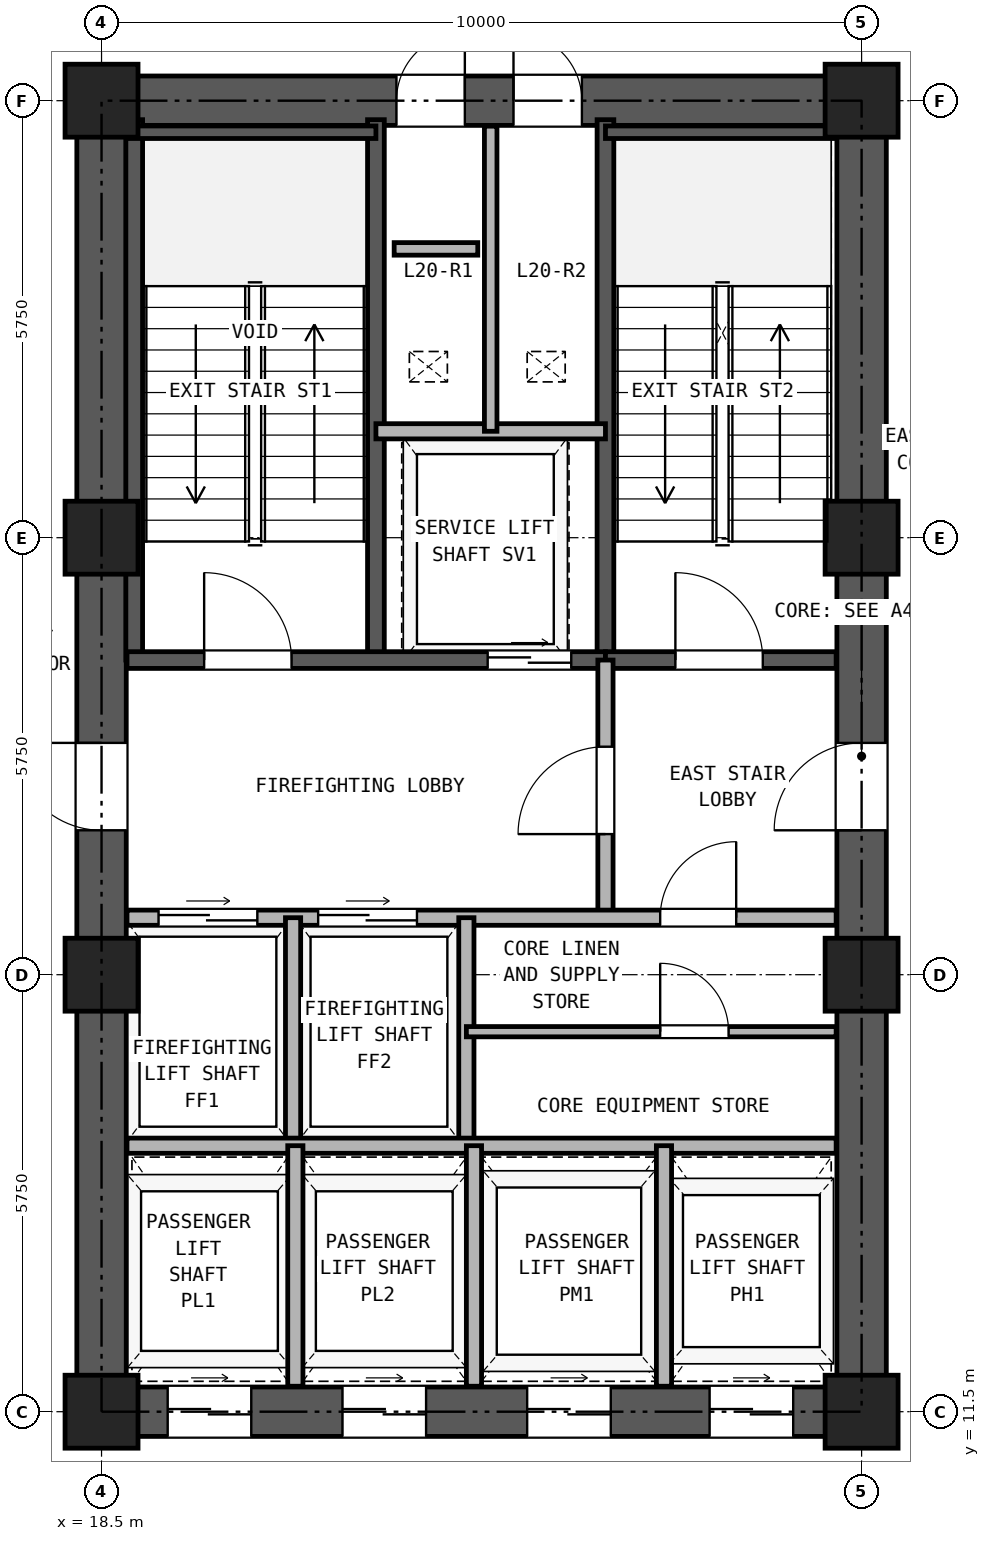
"""IFC4 building model, lengths in metres.
Left out: names, types, materials, properties, quantities, classifications, styles, units other than length and angle.
Written with IfcOpenShell. Run it as: python <this file> out.ifc"""

import sys

from ifc_helpers import new_model, si_unit, direction, frame, frame_2d, origin, origin_2d, place, context, subcontext, project, spatial, rectangle, hollow_rectangle, extrude, source, transform, mapped, element, fill, save


model = new_model("IFC4")
c1 = context("Model", 3, precision=1e-05, world=origin(), true_north=direction((0.0, 1.0)))
c2 = subcontext(c1, "Body", "Model", "MODEL_VIEW")
j1 = project(units=[si_unit("LENGTHUNIT", "METRE"), si_unit("PLANEANGLEUNIT", "RADIAN")], contexts=[c1])
p1 = place(None, origin())
s1 = spatial("IfcSite", under=j1, at=p1, CompositionType="ELEMENT")
p2 = place(p1, origin())
s2 = spatial("IfcBuilding", under=s1, at=p2, CompositionType="ELEMENT")
p3 = place(p2, frame((0.0, 0.0, 76.5)))
s3 = spatial("IfcBuildingStorey", under=s2, at=p3, CompositionType="ELEMENT", Elevation=76.5)
m1 = source(origin(), c2, "Body", "SweptSolid", [
    extrude(hollow_rectangle(XDim=0.96, YDim=0.96, WallThickness=0.06, at=origin_2d()), origin(), (0.0, 0.0, 1.0), 4.22),
])
for number, where, z_axis, x_axis in (
    (1, (18.5, 11.5, 0.0), (0.0, 0.0, 1.0), (1.0, 0.0, 0.0)),
    (2, (18.5, 17.25, 0.0), (0.0, 0.0, 1.0), (1.0, 0.0, 0.0)),
    (3, (18.5, 23.0, 0.0), (0.0, 0.0, 1.0), (1.0, 0.0, 0.0)),
    (4, (18.5, 28.75, 0.0), (0.0, 0.0, 1.0), (1.0, 0.0, 0.0)),
    (5, (28.5, 11.5, 0.0), (0.0, 0.0, 1.0), (1.0, 0.0, 0.0)),
    (6, (28.5, 17.25, 0.0), (0.0, 0.0, 1.0), (1.0, 0.0, 0.0)),
    (7, (28.5, 23.0, 0.0), (0.0, 0.0, 1.0), (1.0, 0.0, 0.0)),
    (8, (28.5, 28.75, 0.0), (0.0, 0.0, 1.0), (1.0, 0.0, 0.0)),
):
    element("IfcColumn", number, at=place(p3, frame(where, z_axis=z_axis, x_axis=x_axis)), inside=s3, PredefinedType="COLUMN", context=c2, shape_type="MappedRepresentation", body=[
        mapped(m1, transform((0.0, 0.0, 0.0), x_axis=(1.0, 0.0, 0.0), y_axis=(0.0, 1.0, 0.0), z_axis=(0.0, 0.0, 1.0), scale=1.0)),
    ])
p4 = place(p3, frame((18.175, 11.5, 0.0), z_axis=(0.0, 0.0, 1.0), x_axis=(1.0, 0.0, 0.0)))
e9 = element("IfcWall", 9, at=p4, inside=s3, PredefinedType="SHEAR", context=c2, shape_type="SweptSolid", body=[
    extrude(rectangle(XDim=10.65, YDim=0.65, at=frame_2d((5.325, 0.0))), origin(), (0.0, 0.0, 1.0), 4.22),
])
p5 = place(p4, frame((1.195, 0.0, 0.0)))
e10 = element("IfcOpeningElement", 10, at=p5, cuts=e9, PredefinedType="OPENING", context=c2, shape_type="SweptSolid", body=[
    extrude(rectangle(XDim=1.1, YDim=2.25, at=frame_2d((0.55, 1.125))), frame((0.0, 0.335, 0.0), z_axis=(0.0, -1.0, 0.0), x_axis=(1.0, 0.0, 0.0)), (0.0, 0.0, 1.0), 0.67),
])
p6 = place(p4, frame((3.495, 0.0, 0.0)))
e11 = element("IfcOpeningElement", 11, at=p6, cuts=e9, PredefinedType="OPENING", context=c2, shape_type="SweptSolid", body=[
    extrude(rectangle(XDim=1.1, YDim=2.25, at=frame_2d((0.55, 1.125))), frame((0.0, 0.335, 0.0), z_axis=(0.0, -1.0, 0.0), x_axis=(1.0, 0.0, 0.0)), (0.0, 0.0, 1.0), 0.67),
])
p7 = place(p4, frame((5.925, 0.0, 0.0)))
e12 = element("IfcOpeningElement", 12, at=p7, cuts=e9, PredefinedType="OPENING", context=c2, shape_type="SweptSolid", body=[
    extrude(rectangle(XDim=1.1, YDim=2.25, at=frame_2d((0.55, 1.125))), frame((0.0, 0.335, 0.0), z_axis=(0.0, -1.0, 0.0), x_axis=(1.0, 0.0, 0.0)), (0.0, 0.0, 1.0), 0.67),
])
p8 = place(p4, frame((8.325, 0.0, 0.0)))
e13 = element("IfcOpeningElement", 13, at=p8, cuts=e9, PredefinedType="OPENING", context=c2, shape_type="SweptSolid", body=[
    extrude(rectangle(XDim=1.1, YDim=2.25, at=frame_2d((0.55, 1.125))), frame((0.0, 0.335, 0.0), z_axis=(0.0, -1.0, 0.0), x_axis=(1.0, 0.0, 0.0)), (0.0, 0.0, 1.0), 0.67),
])
p9 = place(p3, frame((18.175, 28.75, 0.0), z_axis=(0.0, 0.0, 1.0), x_axis=(1.0, 0.0, 0.0)))
e14 = element("IfcWall", 14, at=p9, inside=s3, PredefinedType="SHEAR", context=c2, shape_type="SweptSolid", body=[
    extrude(rectangle(XDim=10.65, YDim=0.65, at=frame_2d((5.325, 0.0))), origin(), (0.0, 0.0, 1.0), 4.22),
])
p10 = place(p9, frame((4.205, 0.0, 0.0)))
e15 = element("IfcOpeningElement", 15, at=p10, cuts=e14, PredefinedType="OPENING", context=c2, shape_type="SweptSolid", body=[
    extrude(rectangle(XDim=0.9, YDim=2.05, at=frame_2d((0.45, 1.025))), frame((0.0, 0.335, 0.0), z_axis=(0.0, -1.0, 0.0), x_axis=(1.0, 0.0, 0.0)), (0.0, 0.0, 1.0), 0.67),
])
p11 = place(p9, frame((5.745, 0.0, 0.0)))
e16 = element("IfcOpeningElement", 16, at=p11, cuts=e14, PredefinedType="OPENING", context=c2, shape_type="SweptSolid", body=[
    extrude(rectangle(XDim=0.9, YDim=2.05, at=frame_2d((0.45, 1.025))), frame((0.0, 0.335, 0.0), z_axis=(0.0, -1.0, 0.0), x_axis=(1.0, 0.0, 0.0)), (0.0, 0.0, 1.0), 0.67),
])
p12 = place(p3, frame((18.5, 11.825, 0.0), z_axis=(0.0, 0.0, 1.0), x_axis=(0.0, 1.0, 0.0)))
e17 = element("IfcWall", 17, at=p12, inside=s3, PredefinedType="SHEAR", context=c2, shape_type="SweptSolid", body=[
    extrude(rectangle(XDim=16.6, YDim=0.65, at=frame_2d((8.3, 0.0))), origin(), (0.0, 0.0, 1.0), 4.22),
])
p13 = place(p12, frame((7.325, 0.0, 0.0)))
e18 = element("IfcOpeningElement", 18, at=p13, cuts=e17, PredefinedType="OPENING", context=c2, shape_type="SweptSolid", body=[
    extrude(rectangle(XDim=1.15, YDim=2.2, at=frame_2d((0.575, 1.1))), frame((0.0, 0.335, 0.0), z_axis=(0.0, -1.0, 0.0), x_axis=(1.0, 0.0, 0.0)), (0.0, 0.0, 1.0), 0.67),
])
p14 = place(p3, frame((28.5, 11.825, 0.0), z_axis=(0.0, 0.0, 1.0), x_axis=(0.0, 1.0, 0.0)))
e19 = element("IfcWall", 19, at=p14, inside=s3, PredefinedType="SHEAR", context=c2, shape_type="SweptSolid", body=[
    extrude(rectangle(XDim=16.6, YDim=0.65, at=frame_2d((8.3, 0.0))), origin(), (0.0, 0.0, 1.0), 4.22),
])
p15 = place(p14, frame((7.325, 0.0, 0.0)))
e20 = element("IfcOpeningElement", 20, at=p15, cuts=e19, PredefinedType="OPENING", context=c2, shape_type="SweptSolid", body=[
    extrude(rectangle(XDim=1.15, YDim=2.2, at=frame_2d((0.575, 1.1))), frame((0.0, 0.335, 0.0), z_axis=(0.0, -1.0, 0.0), x_axis=(1.0, 0.0, 0.0)), (0.0, 0.0, 1.0), 0.67),
])
for number, where, z_axis, x_axis in (
    (21, (18.93, 21.39, 0.0), (0.0, 0.0, 1.0), (0.0, 1.0, 0.0)),
    (22, (22.11, 21.39, 0.0), (0.0, 0.0, 1.0), (0.0, 1.0, 0.0)),
    (23, (25.13, 21.39, 0.0), (0.0, 0.0, 1.0), (0.0, 1.0, 0.0)),
):
    element("IfcWall", number, at=place(p3, frame(where, z_axis=z_axis, x_axis=x_axis)), inside=s3, PredefinedType="SOLIDWALL", context=c2, shape_type="SweptSolid", body=[
        extrude(rectangle(XDim=7.11, YDim=0.22, at=frame_2d((3.555, 0.0))), origin(), (0.0, 0.0, 1.0), 4.22),
    ])
p16 = place(p3, frame((18.835, 28.335, 0.0), z_axis=(0.0, 0.0, 1.0), x_axis=(1.0, 0.0, 0.0)))
e24 = element("IfcWall", 24, at=p16, inside=s3, PredefinedType="PARTITIONING", context=c2, shape_type="SweptSolid", body=[
    extrude(rectangle(XDim=3.275, YDim=0.165, at=frame_2d((1.638, 0.0))), origin(), (0.0, 0.0, 1.0), 4.22),
])
p17 = place(p3, frame((25.13, 28.335, 0.0), z_axis=(0.0, 0.0, 1.0), x_axis=(1.0, 0.0, 0.0)))
e25 = element("IfcWall", 25, at=p17, inside=s3, PredefinedType="PARTITIONING", context=c2, shape_type="SweptSolid", body=[
    extrude(rectangle(XDim=3.035, YDim=0.165, at=frame_2d((1.518, 0.0))), origin(), (0.0, 0.0, 1.0), 4.22),
])
p18 = place(p3, frame((18.835, 21.39, 0.0), z_axis=(0.0, 0.0, 1.0), x_axis=(1.0, 0.0, 0.0)))
e26 = element("IfcWall", 26, at=p18, inside=s3, PredefinedType="SOLIDWALL", context=c2, shape_type="SweptSolid", body=[
    extrude(rectangle(XDim=6.295, YDim=0.22, at=frame_2d((3.147, 0.0))), origin(), (0.0, 0.0, 1.0), 4.22),
])
p19 = place(p18, frame((1.015, 0.0, 0.0)))
e27 = element("IfcOpeningElement", 27, at=p19, cuts=e26, PredefinedType="OPENING", context=c2, shape_type="SweptSolid", body=[
    extrude(rectangle(XDim=1.15, YDim=2.2, at=frame_2d((0.575, 1.1))), frame((0.0, 0.12, 0.0), z_axis=(0.0, -1.0, 0.0), x_axis=(1.0, 0.0, 0.0)), (0.0, 0.0, 1.0), 0.24),
])
p20 = place(p18, frame((4.745, 0.0, 0.0)))
e28 = element("IfcOpeningElement", 28, at=p20, cuts=e26, PredefinedType="OPENING", context=c2, shape_type="SweptSolid", body=[
    extrude(rectangle(XDim=1.1, YDim=2.25, at=frame_2d((0.55, 1.125))), frame((0.0, 0.12, 0.0), z_axis=(0.0, -1.0, 0.0), x_axis=(1.0, 0.0, 0.0)), (0.0, 0.0, 1.0), 0.24),
])
p21 = place(p3, frame((25.13, 21.39, 0.0), z_axis=(0.0, 0.0, 1.0), x_axis=(1.0, 0.0, 0.0)))
e29 = element("IfcWall", 29, at=p21, inside=s3, PredefinedType="SOLIDWALL", context=c2, shape_type="SweptSolid", body=[
    extrude(rectangle(XDim=3.035, YDim=0.22, at=frame_2d((1.518, 0.0))), origin(), (0.0, 0.0, 1.0), 4.22),
])
p22 = place(p21, frame((0.92, 0.0, 0.0)))
e30 = element("IfcOpeningElement", 30, at=p22, cuts=e29, PredefinedType="OPENING", context=c2, shape_type="SweptSolid", body=[
    extrude(rectangle(XDim=1.15, YDim=2.2, at=frame_2d((0.575, 1.1))), frame((0.0, 0.12, 0.0), z_axis=(0.0, -1.0, 0.0), x_axis=(1.0, 0.0, 0.0)), (0.0, 0.0, 1.0), 0.24),
])
p23 = place(p3, frame((22.11, 24.4, 0.0), z_axis=(0.0, 0.0, 1.0), x_axis=(1.0, 0.0, 0.0)))
e31 = element("IfcWall", 31, at=p23, inside=s3, PredefinedType="PARTITIONING", context=c2, shape_type="SweptSolid", body=[
    extrude(rectangle(XDim=3.02, YDim=0.2, at=frame_2d((1.51, 0.0))), origin(), (0.0, 0.0, 1.0), 4.22),
])
p24 = place(p3, frame((23.62, 24.4, 0.0), z_axis=(0.0, 0.0, 1.0), x_axis=(0.0, 1.0, 0.0)))
e32 = element("IfcWall", 32, at=p24, inside=s3, PredefinedType="PARTITIONING", context=c2, shape_type="SweptSolid", body=[
    extrude(rectangle(XDim=4.015, YDim=0.165, at=frame_2d((2.008, 0.0))), origin(), (0.0, 0.0, 1.0), 4.22),
])
p25 = place(p3, frame((25.13, 18.0, 0.0), z_axis=(0.0, 0.0, 1.0), x_axis=(0.0, 1.0, 0.0)))
e33 = element("IfcWall", 33, at=p25, inside=s3, PredefinedType="PARTITIONING", context=c2, shape_type="SweptSolid", body=[
    extrude(rectangle(XDim=3.39, YDim=0.2, at=frame_2d((1.695, 0.0))), origin(), (0.0, 0.0, 1.0), 4.22),
])
p26 = place(p25, frame((1.1, 0.0, 0.0)))
e34 = element("IfcOpeningElement", 34, at=p26, cuts=e33, PredefinedType="OPENING", context=c2, shape_type="SweptSolid", body=[
    extrude(rectangle(XDim=1.15, YDim=2.2, at=frame_2d((0.575, 1.1))), frame((0.0, 0.11, 0.0), z_axis=(0.0, -1.0, 0.0), x_axis=(1.0, 0.0, 0.0)), (0.0, 0.0, 1.0), 0.22),
])
p27 = place(p3, frame((18.835, 18.0, 0.0), z_axis=(0.0, 0.0, 1.0), x_axis=(1.0, 0.0, 0.0)))
e35 = element("IfcWall", 35, at=p27, inside=s3, PredefinedType="PARTITIONING", context=c2, shape_type="SweptSolid", body=[
    extrude(rectangle(XDim=9.33, YDim=0.2, at=frame_2d((4.665, 0.0))), origin(), (0.0, 0.0, 1.0), 4.22),
])
p28 = place(p27, frame((0.415, 0.0, 0.0)))
e36 = element("IfcOpeningElement", 36, at=p28, cuts=e35, PredefinedType="OPENING", context=c2, shape_type="SweptSolid", body=[
    extrude(rectangle(XDim=1.3, YDim=2.3, at=frame_2d((0.65, 1.15))), frame((0.0, 0.11, 0.0), z_axis=(0.0, -1.0, 0.0), x_axis=(1.0, 0.0, 0.0)), (0.0, 0.0, 1.0), 0.22),
])
p29 = place(p27, frame((2.515, 0.0, 0.0)))
e37 = element("IfcOpeningElement", 37, at=p29, cuts=e35, PredefinedType="OPENING", context=c2, shape_type="SweptSolid", body=[
    extrude(rectangle(XDim=1.3, YDim=2.3, at=frame_2d((0.65, 1.15))), frame((0.0, 0.11, 0.0), z_axis=(0.0, -1.0, 0.0), x_axis=(1.0, 0.0, 0.0)), (0.0, 0.0, 1.0), 0.22),
])
p30 = place(p27, frame((7.015, 0.0, 0.0)))
e38 = element("IfcOpeningElement", 38, at=p30, cuts=e35, PredefinedType="OPENING", context=c2, shape_type="SweptSolid", body=[
    extrude(rectangle(XDim=1.0, YDim=2.15, at=frame_2d((0.5, 1.075))), frame((0.0, 0.11, 0.0), z_axis=(0.0, -1.0, 0.0), x_axis=(1.0, 0.0, 0.0)), (0.0, 0.0, 1.0), 0.22),
])
for number, where, z_axis, x_axis in (
    (39, (21.02, 15.0, 0.0), (0.0, 0.0, 1.0), (0.0, 1.0, 0.0)),
    (40, (23.3, 15.0, 0.0), (0.0, 0.0, 1.0), (0.0, 1.0, 0.0)),
):
    element("IfcWall", number, at=place(p3, frame(where, z_axis=z_axis, x_axis=x_axis)), inside=s3, PredefinedType="PARTITIONING", context=c2, shape_type="SweptSolid", body=[
        extrude(rectangle(XDim=3.0, YDim=0.2, at=frame_2d((1.5, 0.0))), origin(), (0.0, 0.0, 1.0), 4.22),
    ])
p31 = place(p3, frame((18.835, 15.0, 0.0), z_axis=(0.0, 0.0, 1.0), x_axis=(1.0, 0.0, 0.0)))
e41 = element("IfcWall", 41, at=p31, inside=s3, PredefinedType="PARTITIONING", context=c2, shape_type="SweptSolid", body=[
    extrude(rectangle(XDim=9.33, YDim=0.2, at=frame_2d((4.665, 0.0))), origin(), (0.0, 0.0, 1.0), 4.22),
])
p32 = place(p3, frame((23.3, 16.5, 0.0), z_axis=(0.0, 0.0, 1.0), x_axis=(1.0, 0.0, 0.0)))
e42 = element("IfcWall", 42, at=p32, inside=s3, PredefinedType="PARTITIONING", context=c2, shape_type="SweptSolid", body=[
    extrude(rectangle(XDim=4.865, YDim=0.135, at=frame_2d((2.433, 0.0))), origin(), (0.0, 0.0, 1.0), 4.22),
])
p33 = place(p32, frame((2.55, 0.0, 0.0)))
e43 = element("IfcOpeningElement", 43, at=p33, cuts=e42, PredefinedType="OPENING", context=c2, shape_type="SweptSolid", body=[
    extrude(rectangle(XDim=0.9, YDim=2.05, at=frame_2d((0.45, 1.025))), frame((0.0, 0.077, 0.0), z_axis=(0.0, -1.0, 0.0), x_axis=(1.0, 0.0, 0.0)), (0.0, 0.0, 1.0), 0.155),
])
for number, where, z_axis, x_axis in (
    (44, (21.05, 11.835, 0.0), (0.0, 0.0, 1.0), (0.0, 1.0, 0.0)),
    (45, (23.4, 11.835, 0.0), (0.0, 0.0, 1.0), (0.0, 1.0, 0.0)),
    (46, (25.9, 11.835, 0.0), (0.0, 0.0, 1.0), (0.0, 1.0, 0.0)),
):
    element("IfcWall", number, at=place(p3, frame(where, z_axis=z_axis, x_axis=x_axis)), inside=s3, PredefinedType="PARTITIONING", context=c2, shape_type="SweptSolid", body=[
        extrude(rectangle(XDim=3.165, YDim=0.2, at=frame_2d((1.583, 0.0))), origin(), (0.0, 0.0, 1.0), 4.22),
    ])
p34 = place(p3, frame((22.35, 26.8, 0.0), z_axis=(0.0, 0.0, 1.0), x_axis=(1.0, 0.0, 0.0)))
e47 = element("IfcWall", 47, at=p34, inside=s3, PredefinedType="PARTITIONING", context=c2, shape_type="SweptSolid", body=[
    extrude(rectangle(XDim=1.1, YDim=0.165, at=frame_2d((0.55, 0.0))), origin(), (0.0, 0.0, 1.0), 4.22),
])
p35 = place(p19, frame((1.15, 0.0, 0.0), z_axis=(0.0, 0.0, 1.0), x_axis=(-1.0, 0.0, 0.0)))
e48 = element("IfcDoor", 48, at=p35, inside=s3, OperationType="SINGLE_SWING_LEFT", PredefinedType="DOOR", context=c2, shape_type="SweptSolid", body=[
    extrude(rectangle(XDim=1.15, YDim=2.2, at=frame_2d((0.575, 1.1))), frame((0.0, 0.025, 0.0), z_axis=(0.0, -1.0, 0.0), x_axis=(1.0, 0.0, 0.0)), (0.0, 0.0, 1.0), 0.05),
])
fill(e27, e48)
p36 = place(p22, frame((1.15, 0.0, 0.0), z_axis=(0.0, 0.0, 1.0), x_axis=(-1.0, 0.0, 0.0)))
e49 = element("IfcDoor", 49, at=p36, inside=s3, OperationType="SINGLE_SWING_LEFT", PredefinedType="DOOR", context=c2, shape_type="SweptSolid", body=[
    extrude(rectangle(XDim=1.15, YDim=2.2, at=frame_2d((0.575, 1.1))), frame((0.0, 0.025, 0.0), z_axis=(0.0, -1.0, 0.0), x_axis=(1.0, 0.0, 0.0)), (0.0, 0.0, 1.0), 0.05),
])
fill(e30, e49)
p37 = place(p20, frame((1.1, 0.0, 0.0), z_axis=(0.0, 0.0, 1.0), x_axis=(-1.0, 0.0, 0.0)))
e50 = element("IfcDoor", 50, at=p37, inside=s3, OperationType="DOUBLE_DOOR_SLIDING", PredefinedType="DOOR", context=c2, shape_type="SweptSolid", body=[
    extrude(rectangle(XDim=1.1, YDim=2.25, at=frame_2d((0.55, 1.125))), frame((0.0, 0.025, 0.0), z_axis=(0.0, -1.0, 0.0), x_axis=(1.0, 0.0, 0.0)), (0.0, 0.0, 1.0), 0.05),
])
fill(e28, e50)
p38 = place(p26, origin())
e51 = element("IfcDoor", 51, at=p38, inside=s3, OperationType="SINGLE_SWING_LEFT", PredefinedType="DOOR", context=c2, shape_type="SweptSolid", body=[
    extrude(rectangle(XDim=1.15, YDim=2.2, at=frame_2d((0.575, 1.1))), frame((0.0, 0.025, 0.0), z_axis=(0.0, -1.0, 0.0), x_axis=(1.0, 0.0, 0.0)), (0.0, 0.0, 1.0), 0.05),
])
fill(e34, e51)
p39 = place(p28, origin())
e52 = element("IfcDoor", 52, at=p39, inside=s3, OperationType="DOUBLE_DOOR_SLIDING", PredefinedType="DOOR", context=c2, shape_type="SweptSolid", body=[
    extrude(rectangle(XDim=1.3, YDim=2.3, at=frame_2d((0.65, 1.15))), frame((0.0, 0.025, 0.0), z_axis=(0.0, -1.0, 0.0), x_axis=(1.0, 0.0, 0.0)), (0.0, 0.0, 1.0), 0.05),
])
fill(e36, e52)
p40 = place(p29, origin())
e53 = element("IfcDoor", 53, at=p40, inside=s3, OperationType="DOUBLE_DOOR_SLIDING", PredefinedType="DOOR", context=c2, shape_type="SweptSolid", body=[
    extrude(rectangle(XDim=1.3, YDim=2.3, at=frame_2d((0.65, 1.15))), frame((0.0, 0.025, 0.0), z_axis=(0.0, -1.0, 0.0), x_axis=(1.0, 0.0, 0.0)), (0.0, 0.0, 1.0), 0.05),
])
fill(e37, e53)
p41 = place(p30, frame((1.0, 0.0, 0.0), z_axis=(0.0, 0.0, 1.0), x_axis=(-1.0, 0.0, 0.0)))
e54 = element("IfcDoor", 54, at=p41, inside=s3, OperationType="SINGLE_SWING_RIGHT", PredefinedType="DOOR", context=c2, shape_type="SweptSolid", body=[
    extrude(rectangle(XDim=1.0, YDim=2.15, at=frame_2d((0.5, 1.075))), frame((0.0, 0.025, 0.0), z_axis=(0.0, -1.0, 0.0), x_axis=(1.0, 0.0, 0.0)), (0.0, 0.0, 1.0), 0.05),
])
fill(e38, e54)
p42 = place(p33, frame((0.9, 0.0, 0.0), z_axis=(0.0, 0.0, 1.0), x_axis=(-1.0, 0.0, 0.0)))
e55 = element("IfcDoor", 55, at=p42, inside=s3, OperationType="SINGLE_SWING_LEFT", PredefinedType="DOOR", context=c2, shape_type="SweptSolid", body=[
    extrude(rectangle(XDim=0.9, YDim=2.05, at=frame_2d((0.45, 1.025))), frame((0.0, 0.025, 0.0), z_axis=(0.0, -1.0, 0.0), x_axis=(1.0, 0.0, 0.0)), (0.0, 0.0, 1.0), 0.05),
])
fill(e43, e55)
p43 = place(p13, frame((1.15, 0.0, 0.0), z_axis=(0.0, 0.0, 1.0), x_axis=(-1.0, 0.0, 0.0)))
e56 = element("IfcDoor", 56, at=p43, inside=s3, OperationType="SINGLE_SWING_RIGHT", PredefinedType="DOOR", context=c2, shape_type="SweptSolid", body=[
    extrude(rectangle(XDim=1.15, YDim=2.2, at=frame_2d((0.575, 1.1))), frame((0.0, 0.025, 0.0), z_axis=(0.0, -1.0, 0.0), x_axis=(1.0, 0.0, 0.0)), (0.0, 0.0, 1.0), 0.05),
])
fill(e18, e56)
p44 = place(p15, origin())
e57 = element("IfcDoor", 57, at=p44, inside=s3, OperationType="SINGLE_SWING_LEFT", PredefinedType="DOOR", context=c2, shape_type="SweptSolid", body=[
    extrude(rectangle(XDim=1.15, YDim=2.2, at=frame_2d((0.575, 1.1))), frame((0.0, 0.025, 0.0), z_axis=(0.0, -1.0, 0.0), x_axis=(1.0, 0.0, 0.0)), (0.0, 0.0, 1.0), 0.05),
])
fill(e20, e57)
p45 = place(p10, origin())
e58 = element("IfcDoor", 58, at=p45, inside=s3, OperationType="SINGLE_SWING_RIGHT", PredefinedType="DOOR", context=c2, shape_type="SweptSolid", body=[
    extrude(rectangle(XDim=0.9, YDim=2.05, at=frame_2d((0.45, 1.025))), frame((0.0, 0.025, 0.0), z_axis=(0.0, -1.0, 0.0), x_axis=(1.0, 0.0, 0.0)), (0.0, 0.0, 1.0), 0.05),
])
fill(e15, e58)
p46 = place(p11, origin())
e59 = element("IfcDoor", 59, at=p46, inside=s3, OperationType="SINGLE_SWING_LEFT", PredefinedType="DOOR", context=c2, shape_type="SweptSolid", body=[
    extrude(rectangle(XDim=0.9, YDim=2.05, at=frame_2d((0.45, 1.025))), frame((0.0, 0.025, 0.0), z_axis=(0.0, -1.0, 0.0), x_axis=(1.0, 0.0, 0.0)), (0.0, 0.0, 1.0), 0.05),
])
fill(e16, e59)
p47 = place(p5, frame((1.1, 0.0, 0.0), z_axis=(0.0, 0.0, 1.0), x_axis=(-1.0, 0.0, 0.0)))
e60 = element("IfcDoor", 60, at=p47, inside=s3, OperationType="DOUBLE_DOOR_SLIDING", PredefinedType="DOOR", context=c2, shape_type="SweptSolid", body=[
    extrude(rectangle(XDim=1.1, YDim=2.25, at=frame_2d((0.55, 1.125))), frame((0.0, 0.025, 0.0), z_axis=(0.0, -1.0, 0.0), x_axis=(1.0, 0.0, 0.0)), (0.0, 0.0, 1.0), 0.05),
])
fill(e10, e60)
p48 = place(p6, frame((1.1, 0.0, 0.0), z_axis=(0.0, 0.0, 1.0), x_axis=(-1.0, 0.0, 0.0)))
e61 = element("IfcDoor", 61, at=p48, inside=s3, OperationType="DOUBLE_DOOR_SLIDING", PredefinedType="DOOR", context=c2, shape_type="SweptSolid", body=[
    extrude(rectangle(XDim=1.1, YDim=2.25, at=frame_2d((0.55, 1.125))), frame((0.0, 0.025, 0.0), z_axis=(0.0, -1.0, 0.0), x_axis=(1.0, 0.0, 0.0)), (0.0, 0.0, 1.0), 0.05),
])
fill(e11, e61)
p49 = place(p7, frame((1.1, 0.0, 0.0), z_axis=(0.0, 0.0, 1.0), x_axis=(-1.0, 0.0, 0.0)))
e62 = element("IfcDoor", 62, at=p49, inside=s3, OperationType="DOUBLE_DOOR_SLIDING", PredefinedType="DOOR", context=c2, shape_type="SweptSolid", body=[
    extrude(rectangle(XDim=1.1, YDim=2.25, at=frame_2d((0.55, 1.125))), frame((0.0, 0.025, 0.0), z_axis=(0.0, -1.0, 0.0), x_axis=(1.0, 0.0, 0.0)), (0.0, 0.0, 1.0), 0.05),
])
fill(e12, e62)
p50 = place(p8, frame((1.1, 0.0, 0.0), z_axis=(0.0, 0.0, 1.0), x_axis=(-1.0, 0.0, 0.0)))
e63 = element("IfcDoor", 63, at=p50, inside=s3, OperationType="DOUBLE_DOOR_SLIDING", PredefinedType="DOOR", context=c2, shape_type="SweptSolid", body=[
    extrude(rectangle(XDim=1.1, YDim=2.25, at=frame_2d((0.55, 1.125))), frame((0.0, 0.025, 0.0), z_axis=(0.0, -1.0, 0.0), x_axis=(1.0, 0.0, 0.0)), (0.0, 0.0, 1.0), 0.05),
])
fill(e13, e63)
save(model, sys.argv[1])
